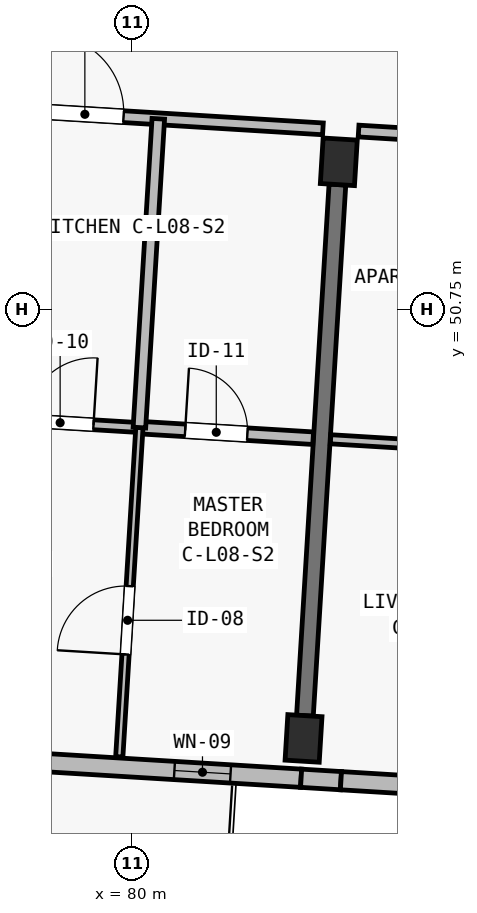
"""IFC4 building model, lengths in metres.
Left out: names, types, materials, properties, quantities, classifications, styles, units other than length and angle.
Written with IfcOpenShell. Run it as: python <this file> out.ifc"""

import sys

from ifc_helpers import new_model, si_unit, direction, frame, frame_2d, origin, origin_2d, place, context, subcontext, project, spatial, polyline, rectangle, outline, extrude, element, fill, save


model = new_model("IFC4")
c1 = context("Model", 3, precision=1e-05, world=origin(), true_north=direction((0.0, 1.0)))
c2 = subcontext(c1, "Body", "Model", "MODEL_VIEW")
j1 = project(units=[si_unit("LENGTHUNIT", "METRE"), si_unit("PLANEANGLEUNIT", "RADIAN")], contexts=[c1])
p1 = place(None, origin())
s1 = spatial("IfcSite", under=j1, at=p1, CompositionType="ELEMENT")
p2 = place(p1, origin())
s2 = spatial("IfcBuilding", under=s1, at=p2, CompositionType="ELEMENT")
p3 = place(p2, frame((0.0, 0.0, 27.9)))
s3 = spatial("IfcBuildingStorey", under=s2, at=p3, CompositionType="ELEMENT", Elevation=27.9)
for number, where, z_axis, x_axis in (
    (1, (82.258, 45.108, 0.0), (0.0, 0.0, 1.0), (0.998, -0.061, 0.0)),
    (2, (82.721, 52.694, 0.0), (0.0, 0.0, 1.0), (0.998, -0.061, 0.0)),
):
    element("IfcColumn", number, at=place(p3, frame(where, z_axis=z_axis, x_axis=x_axis)), inside=s3, PredefinedType="COLUMN", context=c2, shape_type="SweptSolid", body=[
        extrude(rectangle(XDim=0.45, YDim=0.6, at=origin_2d()), origin(), (0.0, 0.0, 1.0), 3.25),
    ])
p4 = place(p3, frame((82.276, 45.407, 0.0), z_axis=(0.0, 0.0, 1.0), x_axis=(0.061034188237, 0.998135676081, 0.0)))
e3 = element("IfcWall", 3, at=p4, inside=s3, PredefinedType="SHEAR", context=c2, shape_type="SweptSolid", body=[
    extrude(rectangle(XDim=7.0, YDim=0.22, at=frame_2d((3.5, 0.0))), origin(), (0.0, 0.0, 1.0), 2.5),
])
p5 = place(p3, frame((82.225, 44.584, 0.0), z_axis=(0.0, 0.0, 1.0), x_axis=(-0.998133591969, 0.061068261669, 0.0)))
e4 = element("IfcWall", 4, at=p5, inside=s3, PredefinedType="SOLIDWALL", context=c2, shape_type="SweptSolid", body=[
    extrude(rectangle(XDim=7.6, YDim=0.24, at=frame_2d((3.8, 0.0))), origin(), (0.0, 0.0, 1.0), 3.0),
])
p6 = place(p5, frame((5.019, 0.0, 0.0)))
e5 = element("IfcOpeningElement", 5, at=p6, cuts=e4, PredefinedType="OPENING", context=c2, shape_type="SweptSolid", body=[
    extrude(rectangle(XDim=1.8, YDim=2.12, at=frame_2d((0.9, 1.06))), frame((0.0, 0.135, 0.0), z_axis=(0.0, -1.0, 0.0), x_axis=(1.0, 0.0, 0.0)), (0.0, 0.0, 1.0), 0.27),
])
p7 = place(p5, frame((0.93, 0.0, 0.46)))
e6 = element("IfcOpeningElement", 6, at=p7, cuts=e4, PredefinedType="OPENING", context=c2, shape_type="SweptSolid", body=[
    extrude(rectangle(XDim=0.74, YDim=2.26, at=frame_2d((0.37, 1.13))), frame((0.0, 0.135, 0.0), z_axis=(0.0, -1.0, 0.0), x_axis=(1.0, 0.0, 0.0)), (0.0, 0.0, 1.0), 0.27),
])
p8 = place(p3, frame((82.75, 44.552, 0.0), z_axis=(0.0, 0.0, 1.0), x_axis=(-0.998143743648, 0.060902110115, 0.0)))
e7 = element("IfcWall", 7, at=p8, inside=s3, PredefinedType="SOLIDWALL", context=c2, shape_type="SweptSolid", body=[
    extrude(rectangle(XDim=0.525, YDim=0.24, at=frame_2d((0.263, 0.0))), origin(), (0.0, 0.0, 1.0), 3.0),
])
p9 = place(p3, frame((89.811, 44.12, 0.0), z_axis=(0.0, 0.0, 1.0), x_axis=(-0.998135069216, 0.061044111925, 0.0)))
e8 = element("IfcWall", 8, at=p9, inside=s3, PredefinedType="SOLIDWALL", context=c2, shape_type="SweptSolid", body=[
    extrude(outline(polyline([(0.0, 0.0), (7.075, 0.0), (7.075, 6.222), (0.0, 4.861), (0.0, 0.0)])), frame((0.0, 0.12, 0.0), z_axis=(0.0, -1.0, 0.0), x_axis=(1.0, 0.0, 0.0)), (0.0, 0.0, 1.0), 0.24),
])
p10 = place(p9, frame((0.61, 0.0, 0.52)))
e9 = element("IfcOpeningElement", 9, at=p10, cuts=e8, PredefinedType="OPENING", context=c2, shape_type="SweptSolid", body=[
    extrude(rectangle(XDim=0.64, YDim=2.18, at=frame_2d((0.32, 1.09))), frame((0.0, 0.135, 0.0), z_axis=(0.0, -1.0, 0.0), x_axis=(1.0, 0.0, 0.0)), (0.0, 0.0, 1.0), 0.27),
])
p11 = place(p9, frame((2.092, 0.0, 0.42)))
e10 = element("IfcOpeningElement", 10, at=p11, cuts=e8, PredefinedType="OPENING", context=c2, shape_type="SweptSolid", body=[
    extrude(rectangle(XDim=0.66, YDim=2.32, at=frame_2d((0.33, 1.16))), frame((0.0, 0.135, 0.0), z_axis=(0.0, -1.0, 0.0), x_axis=(1.0, 0.0, 0.0)), (0.0, 0.0, 1.0), 0.27),
])
p12 = place(p9, frame((5.069, 0.0, 0.52)))
e11 = element("IfcOpeningElement", 11, at=p12, cuts=e8, PredefinedType="OPENING", context=c2, shape_type="SweptSolid", body=[
    extrude(rectangle(XDim=0.7, YDim=2.36, at=frame_2d((0.35, 1.18))), frame((0.0, 0.135, 0.0), z_axis=(0.0, -1.0, 0.0), x_axis=(1.0, 0.0, 0.0)), (0.0, 0.0, 1.0), 0.27),
])
p13 = place(p3, frame((78.415, 53.378, 0.0), z_axis=(0.0, 0.0, 1.0), x_axis=(0.998132736029, -0.061082250024, 0.0)))
e12 = element("IfcWall", 12, at=p13, inside=s3, PredefinedType="PARTITIONING", context=c2, shape_type="SweptSolid", body=[
    extrude(rectangle(XDim=4.105, YDim=0.155, at=frame_2d((2.052, 0.0))), origin(), (0.0, 0.0, 1.0), 2.97),
])
p14 = place(p13, frame((0.457, 0.0, 0.0)))
e13 = element("IfcOpeningElement", 13, at=p14, cuts=e12, PredefinedType="OPENING", context=c2, shape_type="SweptSolid", body=[
    extrude(rectangle(XDim=1.02, YDim=2.2, at=frame_2d((0.51, 1.1))), frame((0.0, 0.093, 0.0), z_axis=(0.0, -1.0, 0.0), x_axis=(1.0, 0.0, 0.0)), (0.0, 0.0, 1.0), 0.185),
])
p15 = place(p3, frame((75.028, 49.508, 0.0), z_axis=(0.0, 0.0, 1.0), x_axis=(0.998135637207, -0.061034823981, 0.0)))
e14 = element("IfcWall", 14, at=p15, inside=s3, PredefinedType="PARTITIONING", context=c2, shape_type="SweptSolid", body=[
    extrude(rectangle(XDim=5.08, YDim=0.13, at=frame_2d((2.54, 0.0))), origin(), (0.0, 0.0, 1.0), 2.97),
])
p16 = place(p15, frame((3.595, 0.0, 0.0)))
e15 = element("IfcOpeningElement", 15, at=p16, cuts=e14, PredefinedType="OPENING", context=c2, shape_type="SweptSolid", body=[
    extrude(rectangle(XDim=0.88, YDim=2.1, at=frame_2d((0.44, 1.05))), frame((0.0, 0.08, 0.0), z_axis=(0.0, -1.0, 0.0), x_axis=(1.0, 0.0, 0.0)), (0.0, 0.0, 1.0), 0.16),
])
p17 = place(p3, frame((80.098, 49.198, 0.0), z_axis=(0.0, 0.0, 1.0), x_axis=(0.998138723231, -0.060984335579, 0.0)))
e16 = element("IfcWall", 16, at=p17, inside=s3, PredefinedType="PLUMBINGWALL", context=c2, shape_type="SweptSolid", body=[
    extrude(rectangle(XDim=2.29, YDim=0.165, at=frame_2d((1.145, 0.0))), origin(), (0.0, 0.0, 1.0), 2.97),
])
p18 = place(p17, frame((0.603, 0.0, 0.0)))
e17 = element("IfcOpeningElement", 17, at=p18, cuts=e16, PredefinedType="OPENING", context=c2, shape_type="SweptSolid", body=[
    extrude(rectangle(XDim=0.82, YDim=2.08, at=frame_2d((0.41, 1.04))), frame((0.0, 0.097, 0.0), z_axis=(0.0, -1.0, 0.0), x_axis=(1.0, 0.0, 0.0)), (0.0, 0.0, 1.0), 0.195),
])
p19 = place(p3, frame((79.833, 44.866, 0.0), z_axis=(0.0, 0.0, 1.0), x_axis=(0.061036861365, 0.998135512621, 0.0)))
e18 = element("IfcWall", 18, at=p19, inside=s3, PredefinedType="PARTITIONING", context=c2, shape_type="SweptSolid", body=[
    extrude(rectangle(XDim=4.34, YDim=0.095, at=frame_2d((2.17, 0.0))), origin(), (0.0, 0.0, 1.0), 2.97),
])
p20 = place(p19, frame((1.35, 0.0, 0.0)))
e19 = element("IfcOpeningElement", 19, at=p20, cuts=e18, PredefinedType="OPENING", context=c2, shape_type="SweptSolid", body=[
    extrude(rectangle(XDim=0.9, YDim=2.1, at=frame_2d((0.45, 1.05))), frame((0.0, 0.062, 0.0), z_axis=(0.0, -1.0, 0.0), x_axis=(1.0, 0.0, 0.0)), (0.0, 0.0, 1.0), 0.125),
])
p21 = place(p3, frame((80.098, 49.198, 0.0), z_axis=(0.0, 0.0, 1.0), x_axis=(0.061063718724, 0.998133869907, 0.0)))
e20 = element("IfcWall", 20, at=p21, inside=s3, PredefinedType="PLUMBINGWALL", context=c2, shape_type="SweptSolid", body=[
    extrude(rectangle(XDim=4.07, YDim=0.165, at=frame_2d((2.035, 0.0))), origin(), (0.0, 0.0, 1.0), 2.97),
])
p22 = place(p3, frame((82.982, 53.099, 0.0), z_axis=(0.0, 0.0, 1.0), x_axis=(0.998134569689, -0.061052279168, 0.0)))
e21 = element("IfcWall", 21, at=p22, inside=s3, PredefinedType="PARTITIONING", context=c2, shape_type="SweptSolid", body=[
    extrude(rectangle(XDim=7.13, YDim=0.155, at=frame_2d((3.565, 0.0))), origin(), (0.0, 0.0, 1.0), 2.97),
])
p23 = place(p22, frame((1.355, 0.0, 0.0)))
e22 = element("IfcOpeningElement", 22, at=p23, cuts=e21, PredefinedType="OPENING", context=c2, shape_type="SweptSolid", body=[
    extrude(rectangle(XDim=0.98, YDim=2.15, at=frame_2d((0.49, 1.075))), frame((0.0, 0.093, 0.0), z_axis=(0.0, -1.0, 0.0), x_axis=(1.0, 0.0, 0.0)), (0.0, 0.0, 1.0), 0.185),
])
p24 = place(p3, frame((82.613, 49.044, 0.0), z_axis=(0.0, 0.0, 1.0), x_axis=(0.998136719672, -0.061017119263, 0.0)))
e23 = element("IfcWall", 23, at=p24, inside=s3, PredefinedType="PARTITIONING", context=c2, shape_type="SweptSolid", body=[
    extrude(rectangle(XDim=3.685, YDim=0.12, at=frame_2d((1.843, 0.0))), origin(), (0.0, 0.0, 1.0), 2.97),
])
p25 = place(p24, frame((1.525, 0.0, 0.0)))
e24 = element("IfcOpeningElement", 24, at=p25, cuts=e23, PredefinedType="OPENING", context=c2, shape_type="SweptSolid", body=[
    extrude(rectangle(XDim=0.9, YDim=2.1, at=frame_2d((0.45, 1.05))), frame((0.0, 0.075, 0.0), z_axis=(0.0, -1.0, 0.0), x_axis=(1.0, 0.0, 0.0)), (0.0, 0.0, 1.0), 0.15),
])
p26 = place(p7, origin())
e25 = element("IfcWindow", 25, at=p26, inside=s3, PartitioningType="SINGLE_PANEL", PredefinedType="WINDOW", context=c2, shape_type="SweptSolid", body=[
    extrude(rectangle(XDim=0.74, YDim=2.26, at=frame_2d((0.37, 1.13))), frame((0.0, 0.03, 0.0), z_axis=(0.0, -1.0, 0.0), x_axis=(1.0, 0.0, 0.0)), (0.0, 0.0, 1.0), 0.06),
])
fill(e6, e25)
p27 = place(p14, origin())
e26 = element("IfcDoor", 26, at=p27, inside=s3, OperationType="SINGLE_SWING_LEFT", PredefinedType="DOOR", context=c2, shape_type="SweptSolid", body=[
    extrude(rectangle(XDim=1.02, YDim=2.2, at=frame_2d((0.51, 1.1))), frame((0.0, 0.025, 0.0), z_axis=(0.0, -1.0, 0.0), x_axis=(1.0, 0.0, 0.0)), (0.0, 0.0, 1.0), 0.05),
])
fill(e13, e26)
p28 = place(p16, origin())
e27 = element("IfcDoor", 27, at=p28, inside=s3, OperationType="SINGLE_SWING_RIGHT", PredefinedType="DOOR", context=c2, shape_type="SweptSolid", body=[
    extrude(rectangle(XDim=0.88, YDim=2.1, at=frame_2d((0.44, 1.05))), frame((0.0, 0.025, 0.0), z_axis=(0.0, -1.0, 0.0), x_axis=(1.0, 0.0, 0.0)), (0.0, 0.0, 1.0), 0.05),
])
fill(e15, e27)
p29 = place(p18, origin())
e28 = element("IfcDoor", 28, at=p29, inside=s3, OperationType="SINGLE_SWING_LEFT", PredefinedType="DOOR", context=c2, shape_type="SweptSolid", body=[
    extrude(rectangle(XDim=0.82, YDim=2.08, at=frame_2d((0.41, 1.04))), frame((0.0, 0.025, 0.0), z_axis=(0.0, -1.0, 0.0), x_axis=(1.0, 0.0, 0.0)), (0.0, 0.0, 1.0), 0.05),
])
fill(e17, e28)
p30 = place(p20, origin())
e29 = element("IfcDoor", 29, at=p30, inside=s3, OperationType="SINGLE_SWING_LEFT", PredefinedType="DOOR", context=c2, shape_type="SweptSolid", body=[
    extrude(rectangle(XDim=0.9, YDim=2.1, at=frame_2d((0.45, 1.05))), frame((0.0, 0.025, 0.0), z_axis=(0.0, -1.0, 0.0), x_axis=(1.0, 0.0, 0.0)), (0.0, 0.0, 1.0), 0.05),
])
fill(e19, e29)
save(model, sys.argv[1])
